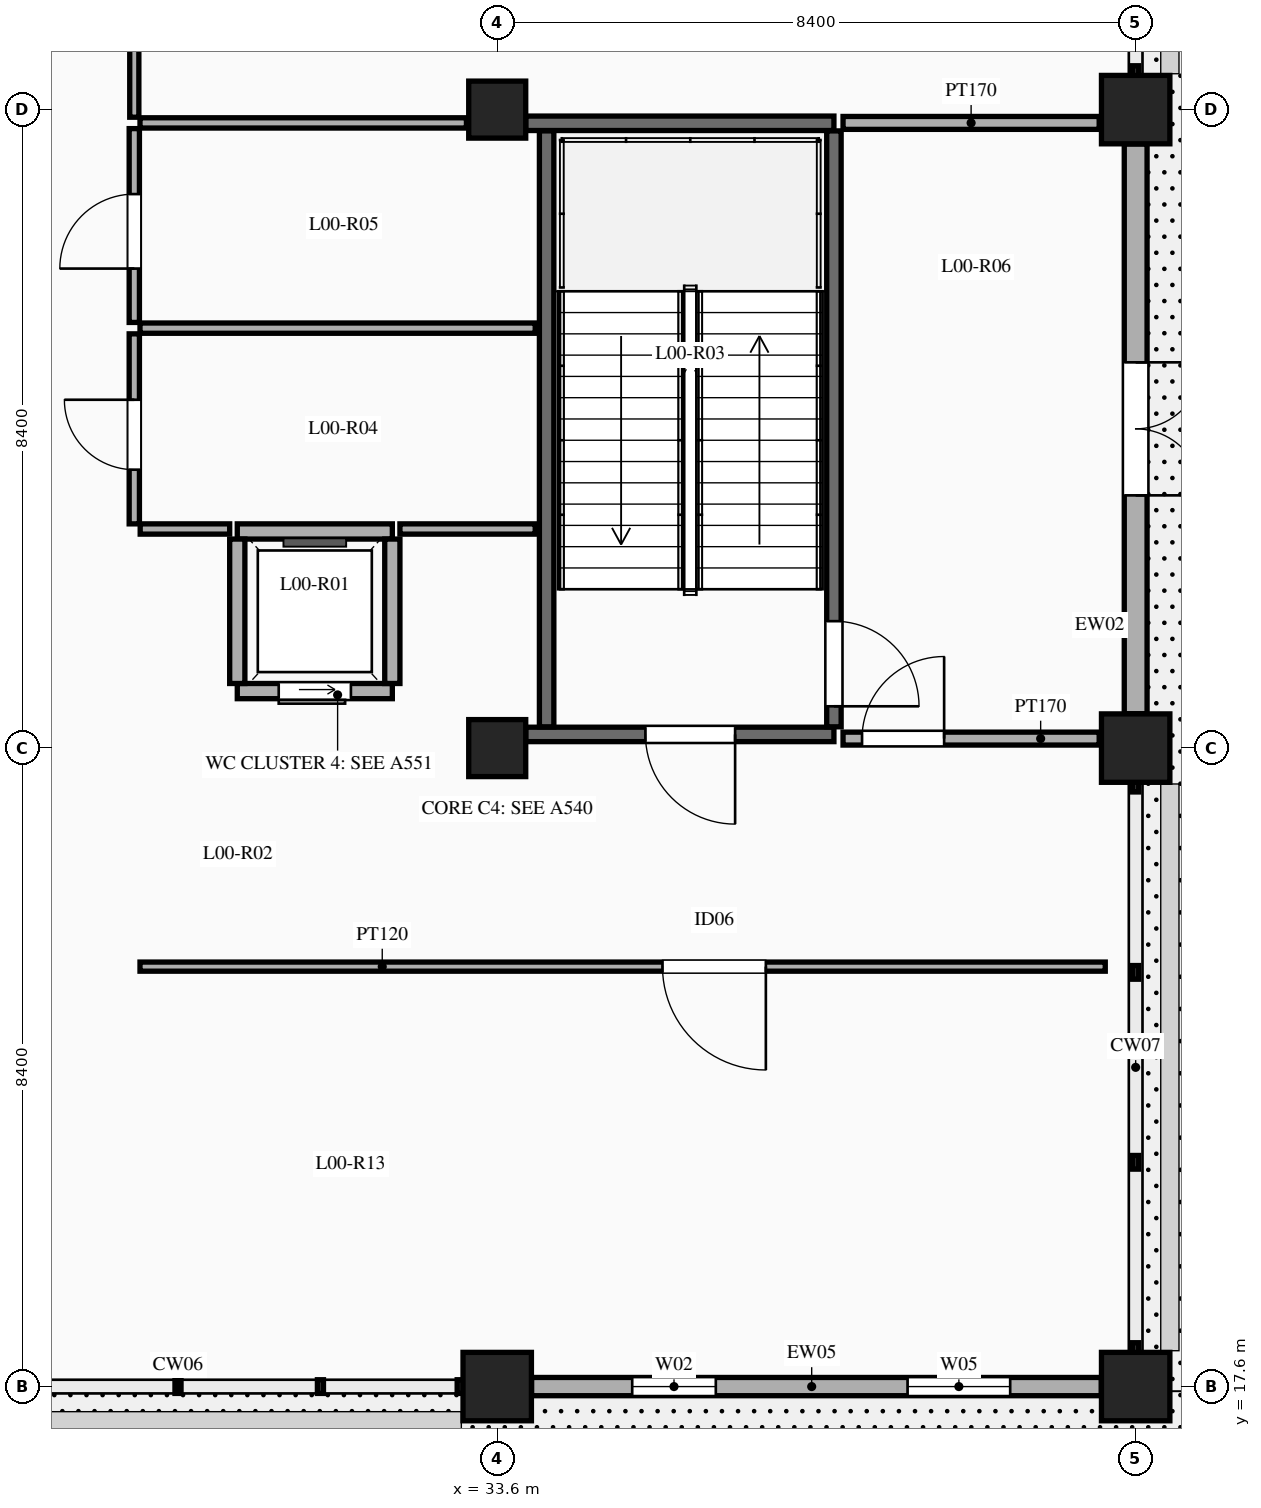
"""IFC4 building model, lengths in metres.
Left out: names, types, materials, properties, quantities, classifications, styles, units other than length and angle.
Written with IfcOpenShell. Run it as: python <this file> out.ifc"""

import sys

from ifc_helpers import new_model, si_unit, direction, frame, frame_2d, origin, origin_2d, place, context, subcontext, project, spatial, rectangle, circle, extrude, element, fill, save


model = new_model("IFC4")
c1 = context("Model", 3, precision=1e-05, world=origin(), true_north=direction((0.0, 1.0)))
c2 = subcontext(c1, "Body", "Model", "MODEL_VIEW")
j1 = project(units=[si_unit("LENGTHUNIT", "METRE"), si_unit("PLANEANGLEUNIT", "RADIAN")], contexts=[c1])
p1 = place(None, origin())
s1 = spatial("IfcSite", under=j1, at=p1, CompositionType="ELEMENT")
p2 = place(p1, origin())
s2 = spatial("IfcBuilding", under=s1, at=p2, CompositionType="ELEMENT")
p3 = place(p2, origin())
s3 = spatial("IfcBuildingStorey", under=s2, at=p3, CompositionType="ELEMENT", Elevation=0.0)
p4 = place(p3, frame((33.6, 17.6, 0.0), z_axis=(0.0, 0.0, 1.0), x_axis=(1.0, 0.0, 0.0)))
e1 = element("IfcColumn", 1, at=p4, inside=s3, PredefinedType="COLUMN", context=c2, shape_type="SweptSolid", body=[
    extrude(circle(Radius=0.45, at=origin_2d()), origin(), (0.0, 0.0, 1.0), 5.4),
])
for number, where, z_axis, x_axis in (
    (2, (33.6, 26.0, 0.0), (0.0, 0.0, 1.0), (1.0, 0.0, 0.0)),
    (3, (33.6, 34.4, 0.0), (0.0, 0.0, 1.0), (1.0, 0.0, 0.0)),
):
    element("IfcColumn", number, at=place(p3, frame(where, z_axis=z_axis, x_axis=x_axis)), inside=s3, PredefinedType="COLUMN", context=c2, shape_type="SweptSolid", body=[
        extrude(rectangle(XDim=0.75, YDim=0.75, at=origin_2d()), origin(), (0.0, 0.0, 1.0), 5.4),
    ])
for number, where, z_axis, x_axis in (
    (4, (42.0, 17.6, 0.0), (0.0, 0.0, 1.0), (1.0, 0.0, 0.0)),
    (5, (42.0, 26.0, 0.0), (0.0, 0.0, 1.0), (1.0, 0.0, 0.0)),
    (6, (42.0, 34.4, 0.0), (0.0, 0.0, 1.0), (1.0, 0.0, 0.0)),
):
    element("IfcColumn", number, at=place(p3, frame(where, z_axis=z_axis, x_axis=x_axis)), inside=s3, PredefinedType="COLUMN", context=c2, shape_type="SweptSolid", body=[
        extrude(circle(Radius=0.45, at=origin_2d()), origin(), (0.0, 0.0, 1.0), 5.4),
    ])
p5 = place(p3, frame((34.052, 17.6, 0.0), z_axis=(0.0, 0.0, 1.0), x_axis=(1.0, 0.0, 0.0)))
e7 = element("IfcWall", 7, at=p5, inside=s3, PredefinedType="SOLIDWALL", context=c2, shape_type="SweptSolid", body=[
    extrude(rectangle(XDim=7.496, YDim=0.24, at=frame_2d((3.748, 0.0))), origin(), (0.0, 0.0, 1.0), 4.45),
])
p6 = place(p5, frame((1.324, 0.0, 0.9)))
e8 = element("IfcOpeningElement", 8, at=p6, cuts=e7, PredefinedType="OPENING", context=c2, shape_type="SweptSolid", body=[
    extrude(rectangle(XDim=1.1, YDim=1.95, at=frame_2d((0.55, 0.975))), frame((0.0, 0.13, 0.0), z_axis=(0.0, -1.0, 0.0), x_axis=(1.0, 0.0, 0.0)), (0.0, 0.0, 1.0), 0.26),
])
p7 = place(p5, frame((4.947, 0.0, 0.9)))
e9 = element("IfcOpeningElement", 9, at=p7, cuts=e7, PredefinedType="OPENING", context=c2, shape_type="SweptSolid", body=[
    extrude(rectangle(XDim=1.35, YDim=1.85, at=frame_2d((0.675, 0.925))), frame((0.0, 0.13, 0.0), z_axis=(0.0, -1.0, 0.0), x_axis=(1.0, 0.0, 0.0)), (0.0, 0.0, 1.0), 0.26),
])
p8 = place(p3, frame((42.0, 26.452, 0.0), z_axis=(0.0, 0.0, 1.0), x_axis=(0.0, 1.0, 0.0)))
e10 = element("IfcWall", 10, at=p8, inside=s3, PredefinedType="SOLIDWALL", context=c2, shape_type="SweptSolid", body=[
    extrude(rectangle(XDim=7.496, YDim=0.3, at=frame_2d((3.748, 0.0))), origin(), (0.0, 0.0, 1.0), 4.45),
])
p9 = place(p8, frame((2.873, 0.0, 0.0)))
e11 = element("IfcOpeningElement", 11, at=p9, cuts=e10, PredefinedType="OPENING", context=c2, shape_type="SweptSolid", body=[
    extrude(rectangle(XDim=1.75, YDim=2.35, at=frame_2d((0.875, 1.175))), frame((0.0, 0.16, 0.0), z_axis=(0.0, -1.0, 0.0), x_axis=(1.0, 0.0, 0.0)), (0.0, 0.0, 1.0), 0.32),
])
p10 = place(p3, frame((30.18, 26.75, 0.0), z_axis=(0.0, 0.0, 1.0), x_axis=(1.0, 0.0, 0.0)))
e12 = element("IfcWall", 12, at=p10, inside=s3, PredefinedType="SOLIDWALL", context=c2, shape_type="SweptSolid", body=[
    extrude(rectangle(XDim=2.04, YDim=0.2, at=frame_2d((1.02, 0.0))), origin(), (0.0, 0.0, 1.0), 5.2),
])
p11 = place(p10, frame((0.545, 0.0, 0.0)))
e13 = element("IfcOpeningElement", 13, at=p11, cuts=e12, PredefinedType="OPENING", context=c2, shape_type="SweptSolid", body=[
    extrude(rectangle(XDim=0.95, YDim=2.15, at=frame_2d((0.475, 1.075))), frame((0.0, 0.11, 0.0), z_axis=(0.0, -1.0, 0.0), x_axis=(1.0, 0.0, 0.0)), (0.0, 0.0, 1.0), 0.22),
])
p12 = place(p3, frame((30.18, 28.85, 0.0), z_axis=(0.0, 0.0, 1.0), x_axis=(1.0, 0.0, 0.0)))
e14 = element("IfcWall", 14, at=p12, inside=s3, PredefinedType="SOLIDWALL", context=c2, shape_type="SweptSolid", body=[
    extrude(rectangle(XDim=2.04, YDim=0.2, at=frame_2d((1.02, 0.0))), origin(), (0.0, 0.0, 1.0), 5.2),
])
for number, where, z_axis, x_axis in (
    (15, (30.18, 26.85, 0.0), (0.0, 0.0, 1.0), (0.0, 1.0, 0.0)),
    (16, (32.22, 26.85, 0.0), (0.0, 0.0, 1.0), (0.0, 1.0, 0.0)),
):
    element("IfcWall", number, at=place(p3, frame(where, z_axis=z_axis, x_axis=x_axis)), inside=s3, PredefinedType="SOLIDWALL", context=c2, shape_type="SweptSolid", body=[
        extrude(rectangle(XDim=1.9, YDim=0.2, at=frame_2d((0.95, 0.0))), origin(), (0.0, 0.0, 1.0), 5.2),
    ])
p13 = place(p3, frame((33.975, 26.18, 0.0), z_axis=(0.0, 0.0, 1.0), x_axis=(1.0, 0.0, 0.0)))
e17 = element("IfcWall", 17, at=p13, inside=s3, PredefinedType="SOLIDWALL", context=c2, shape_type="SweptSolid", body=[
    extrude(rectangle(XDim=4.055, YDim=0.19, at=frame_2d((2.027, 0.0))), origin(), (0.0, 0.0, 1.0), 5.2),
])
p14 = place(p13, frame((1.575, 0.0, 0.0)))
e18 = element("IfcOpeningElement", 18, at=p14, cuts=e17, PredefinedType="OPENING", context=c2, shape_type="SweptSolid", body=[
    extrude(rectangle(XDim=1.18, YDim=2.15, at=frame_2d((0.59, 1.075))), frame((0.0, 0.105, 0.0), z_axis=(0.0, -1.0, 0.0), x_axis=(1.0, 0.0, 0.0)), (0.0, 0.0, 1.0), 0.21),
])
p15 = place(p3, frame((33.975, 34.22, 0.0), z_axis=(0.0, 0.0, 1.0), x_axis=(1.0, 0.0, 0.0)))
e19 = element("IfcWall", 19, at=p15, inside=s3, PredefinedType="SOLIDWALL", context=c2, shape_type="SweptSolid", body=[
    extrude(rectangle(XDim=4.055, YDim=0.19, at=frame_2d((2.027, 0.0))), origin(), (0.0, 0.0, 1.0), 5.2),
])
p16 = place(p3, frame((34.25, 26.28, 0.0), z_axis=(0.0, 0.0, 1.0), x_axis=(0.0, 1.0, 0.0)))
e20 = element("IfcWall", 20, at=p16, inside=s3, PredefinedType="SOLIDWALL", context=c2, shape_type="SweptSolid", body=[
    extrude(rectangle(XDim=7.84, YDim=0.19, at=frame_2d((3.92, 0.0))), origin(), (0.0, 0.0, 1.0), 5.2),
])
p17 = place(p3, frame((38.03, 26.28, 0.0), z_axis=(0.0, 0.0, 1.0), x_axis=(0.0, 1.0, 0.0)))
e21 = element("IfcWall", 21, at=p17, inside=s3, PredefinedType="SOLIDWALL", context=c2, shape_type="SweptSolid", body=[
    extrude(rectangle(XDim=7.84, YDim=0.19, at=frame_2d((3.92, 0.0))), origin(), (0.0, 0.0, 1.0), 5.2),
])
p18 = place(p17, frame((0.27, 0.0, 0.0)))
e22 = element("IfcOpeningElement", 22, at=p18, cuts=e21, PredefinedType="OPENING", context=c2, shape_type="SweptSolid", body=[
    extrude(rectangle(XDim=1.12, YDim=2.15, at=frame_2d((0.56, 1.075))), frame((0.0, 0.105, 0.0), z_axis=(0.0, -1.0, 0.0), x_axis=(1.0, 0.0, 0.0)), (0.0, 0.0, 1.0), 0.21),
])
p19 = place(p3, frame((38.15, 26.125, 0.0), z_axis=(0.0, 0.0, 1.0), x_axis=(1.0, 0.0, 0.0)))
e23 = element("IfcWall", 23, at=p19, inside=s3, PredefinedType="PARTITIONING", context=c2, shape_type="SweptSolid", body=[
    extrude(rectangle(XDim=3.37, YDim=0.17, at=frame_2d((1.685, 0.0))), origin(), (0.0, 0.0, 1.0), 4.35),
])
p20 = place(p19, frame((0.25, 0.0, 0.0)))
e24 = element("IfcOpeningElement", 24, at=p20, cuts=e23, PredefinedType="OPENING", context=c2, shape_type="SweptSolid", body=[
    extrude(rectangle(XDim=1.08, YDim=2.15, at=frame_2d((0.54, 1.075))), frame((0.0, 0.095, 0.0), z_axis=(0.0, -1.0, 0.0), x_axis=(1.0, 0.0, 0.0)), (0.0, 0.0, 1.0), 0.19),
])
p21 = place(p3, frame((28.9, 23.125, 0.0), z_axis=(0.0, 0.0, 1.0), x_axis=(1.0, 0.0, 0.0)))
e25 = element("IfcWall", 25, at=p21, inside=s3, PredefinedType="PARTITIONING", context=c2, shape_type="SweptSolid", body=[
    extrude(rectangle(XDim=12.7, YDim=0.12, at=frame_2d((6.35, 0.0))), origin(), (0.0, 0.0, 1.0), 4.35),
])
p22 = place(p21, frame((6.875, 0.0, 0.0)))
e26 = element("IfcOpeningElement", 26, at=p22, cuts=e25, PredefinedType="OPENING", context=c2, shape_type="SweptSolid", body=[
    extrude(rectangle(XDim=1.36, YDim=2.3, at=frame_2d((0.68, 1.15))), frame((0.0, 0.07, 0.0), z_axis=(0.0, -1.0, 0.0), x_axis=(1.0, 0.0, 0.0)), (0.0, 0.0, 1.0), 0.14),
])
p23 = place(p3, frame((28.9, 31.525, 0.0), z_axis=(0.0, 0.0, 1.0), x_axis=(1.0, 0.0, 0.0)))
e27 = element("IfcWall", 27, at=p23, inside=s3, PredefinedType="PARTITIONING", context=c2, shape_type="SweptSolid", body=[
    extrude(rectangle(XDim=5.2, YDim=0.135, at=frame_2d((2.6, 0.0))), origin(), (0.0, 0.0, 1.0), 4.35),
])
p24 = place(p3, frame((28.825, 28.95, 0.0), z_axis=(0.0, 0.0, 1.0), x_axis=(0.0, 1.0, 0.0)))
e28 = element("IfcWall", 28, at=p24, inside=s3, PredefinedType="PARTITIONING", context=c2, shape_type="SweptSolid", body=[
    extrude(rectangle(XDim=2.5, YDim=0.135, at=frame_2d((1.25, 0.0))), origin(), (0.0, 0.0, 1.0), 4.35),
])
p25 = place(p24, frame((0.713, 0.0, 0.0)))
e29 = element("IfcOpeningElement", 29, at=p25, cuts=e28, PredefinedType="OPENING", context=c2, shape_type="SweptSolid", body=[
    extrude(rectangle(XDim=0.92, YDim=2.12, at=frame_2d((0.46, 1.06))), frame((0.0, 0.077, 0.0), z_axis=(0.0, -1.0, 0.0), x_axis=(1.0, 0.0, 0.0)), (0.0, 0.0, 1.0), 0.155),
])
p26 = place(p3, frame((28.825, 31.6, 0.0), z_axis=(0.0, 0.0, 1.0), x_axis=(0.0, 1.0, 0.0)))
e30 = element("IfcWall", 30, at=p26, inside=s3, PredefinedType="PARTITIONING", context=c2, shape_type="SweptSolid", body=[
    extrude(rectangle(XDim=2.55, YDim=0.135, at=frame_2d((1.275, 0.0))), origin(), (0.0, 0.0, 1.0), 4.35),
])
p27 = place(p26, frame((0.708, 0.0, 0.0)))
e31 = element("IfcOpeningElement", 31, at=p27, cuts=e30, PredefinedType="OPENING", context=c2, shape_type="SweptSolid", body=[
    extrude(rectangle(XDim=0.98, YDim=2.15, at=frame_2d((0.49, 1.075))), frame((0.0, 0.077, 0.0), z_axis=(0.0, -1.0, 0.0), x_axis=(1.0, 0.0, 0.0)), (0.0, 0.0, 1.0), 0.155),
])
p28 = place(p3, frame((28.9, 34.225, 0.0), z_axis=(0.0, 0.0, 1.0), x_axis=(1.0, 0.0, 0.0)))
e32 = element("IfcWall", 32, at=p28, inside=s3, PredefinedType="PARTITIONING", context=c2, shape_type="SweptSolid", body=[
    extrude(rectangle(XDim=4.295, YDim=0.135, at=frame_2d((2.147, 0.0))), origin(), (0.0, 0.0, 1.0), 4.35),
])
p29 = place(p3, frame((38.15, 34.225, 0.0), z_axis=(0.0, 0.0, 1.0), x_axis=(1.0, 0.0, 0.0)))
e33 = element("IfcWall", 33, at=p29, inside=s3, PredefinedType="PARTITIONING", context=c2, shape_type="SweptSolid", body=[
    extrude(rectangle(XDim=3.37, YDim=0.17, at=frame_2d((1.685, 0.0))), origin(), (0.0, 0.0, 1.0), 4.35),
])
p30 = place(p3, frame((28.825, 34.3, 0.0), z_axis=(0.0, 0.0, 1.0), x_axis=(0.0, 1.0, 0.0)))
e34 = element("IfcWall", 34, at=p30, inside=s3, PredefinedType="PARTITIONING", context=c2, shape_type="SweptSolid", body=[
    extrude(rectangle(XDim=21.9, YDim=0.12, at=frame_2d((10.95, 0.0))), origin(), (0.0, 0.0, 1.0), 4.35),
])
p31 = place(p30, frame((10.27, 0.0, 0.0)))
e35 = element("IfcOpeningElement", 35, at=p31, cuts=e34, PredefinedType="OPENING", context=c2, shape_type="SweptSolid", body=[
    extrude(rectangle(XDim=1.36, YDim=2.3, at=frame_2d((0.68, 1.15))), frame((0.0, 0.07, 0.0), z_axis=(0.0, -1.0, 0.0), x_axis=(1.0, 0.0, 0.0)), (0.0, 0.0, 1.0), 0.14),
])
p32 = place(p3, frame((28.903, 28.883, 0.0), z_axis=(0.0, 0.0, 1.0), x_axis=(1.0, 0.0, 0.0)))
e36 = element("IfcWall", 36, at=p32, inside=s3, PredefinedType="PARTITIONING", context=c2, shape_type="SweptSolid", body=[
    extrude(rectangle(XDim=1.177, YDim=0.135, at=frame_2d((0.589, 0.0))), origin(), (0.0, 0.0, 1.0), 4.35),
])
p33 = place(p3, frame((32.32, 28.883, 0.0), z_axis=(0.0, 0.0, 1.0), x_axis=(1.0, 0.0, 0.0)))
e37 = element("IfcWall", 37, at=p33, inside=s3, PredefinedType="PARTITIONING", context=c2, shape_type="SweptSolid", body=[
    extrude(rectangle(XDim=1.78, YDim=0.135, at=frame_2d((0.89, 0.0))), origin(), (0.0, 0.0, 1.0), 4.35),
])
p34 = place(p6, origin())
e38 = element("IfcWindow", 38, at=p34, inside=s3, PartitioningType="SINGLE_PANEL", PredefinedType="WINDOW", context=c2, shape_type="SweptSolid", body=[
    extrude(rectangle(XDim=1.1, YDim=1.95, at=frame_2d((0.55, 0.975))), frame((0.0, 0.03, 0.0), z_axis=(0.0, -1.0, 0.0), x_axis=(1.0, 0.0, 0.0)), (0.0, 0.0, 1.0), 0.06),
])
fill(e8, e38)
p35 = place(p7, origin())
e39 = element("IfcWindow", 39, at=p35, inside=s3, PartitioningType="DOUBLE_PANEL_VERTICAL", PredefinedType="WINDOW", context=c2, shape_type="SweptSolid", body=[
    extrude(rectangle(XDim=1.35, YDim=1.85, at=frame_2d((0.675, 0.925))), frame((0.0, 0.03, 0.0), z_axis=(0.0, -1.0, 0.0), x_axis=(1.0, 0.0, 0.0)), (0.0, 0.0, 1.0), 0.06),
])
fill(e9, e39)
p36 = place(p9, frame((1.75, 0.0, 0.0), z_axis=(0.0, 0.0, 1.0), x_axis=(-1.0, 0.0, 0.0)))
e40 = element("IfcDoor", 40, at=p36, inside=s3, OperationType="DOUBLE_DOOR_SINGLE_SWING", PredefinedType="DOOR", context=c2, shape_type="SweptSolid", body=[
    extrude(rectangle(XDim=1.75, YDim=2.35, at=frame_2d((0.875, 1.175))), frame((0.0, 0.025, 0.0), z_axis=(0.0, -1.0, 0.0), x_axis=(1.0, 0.0, 0.0)), (0.0, 0.0, 1.0), 0.05),
])
fill(e11, e40)
p37 = place(p11, frame((0.95, 0.0, 0.0), z_axis=(0.0, 0.0, 1.0), x_axis=(-1.0, 0.0, 0.0)))
e41 = element("IfcDoor", 41, at=p37, inside=s3, OperationType="SLIDING_TO_LEFT", PredefinedType="DOOR", context=c2, shape_type="SweptSolid", body=[
    extrude(rectangle(XDim=0.95, YDim=2.15, at=frame_2d((0.475, 1.075))), frame((0.0, 0.025, 0.0), z_axis=(0.0, -1.0, 0.0), x_axis=(1.0, 0.0, 0.0)), (0.0, 0.0, 1.0), 0.05),
])
fill(e13, e41)
p38 = place(p18, frame((1.12, 0.0, 0.0), z_axis=(0.0, 0.0, 1.0), x_axis=(-1.0, 0.0, 0.0)))
e42 = element("IfcDoor", 42, at=p38, inside=s3, OperationType="SINGLE_SWING_RIGHT", PredefinedType="DOOR", context=c2, shape_type="SweptSolid", body=[
    extrude(rectangle(XDim=1.12, YDim=2.15, at=frame_2d((0.56, 1.075))), frame((0.0, 0.025, 0.0), z_axis=(0.0, -1.0, 0.0), x_axis=(1.0, 0.0, 0.0)), (0.0, 0.0, 1.0), 0.05),
])
fill(e22, e42)
p39 = place(p14, frame((1.18, 0.0, 0.0), z_axis=(0.0, 0.0, 1.0), x_axis=(-1.0, 0.0, 0.0)))
e43 = element("IfcDoor", 43, at=p39, inside=s3, OperationType="SINGLE_SWING_LEFT", PredefinedType="DOOR", context=c2, shape_type="SweptSolid", body=[
    extrude(rectangle(XDim=1.18, YDim=2.15, at=frame_2d((0.59, 1.075))), frame((0.0, 0.025, 0.0), z_axis=(0.0, -1.0, 0.0), x_axis=(1.0, 0.0, 0.0)), (0.0, 0.0, 1.0), 0.05),
])
fill(e18, e43)
p40 = place(p25, origin())
e44 = element("IfcDoor", 44, at=p40, inside=s3, OperationType="SINGLE_SWING_RIGHT", PredefinedType="DOOR", context=c2, shape_type="SweptSolid", body=[
    extrude(rectangle(XDim=0.92, YDim=2.12, at=frame_2d((0.46, 1.06))), frame((0.0, 0.025, 0.0), z_axis=(0.0, -1.0, 0.0), x_axis=(1.0, 0.0, 0.0)), (0.0, 0.0, 1.0), 0.05),
])
fill(e29, e44)
p41 = place(p27, origin())
e45 = element("IfcDoor", 45, at=p41, inside=s3, OperationType="SINGLE_SWING_LEFT", PredefinedType="DOOR", context=c2, shape_type="SweptSolid", body=[
    extrude(rectangle(XDim=0.98, YDim=2.15, at=frame_2d((0.49, 1.075))), frame((0.0, 0.025, 0.0), z_axis=(0.0, -1.0, 0.0), x_axis=(1.0, 0.0, 0.0)), (0.0, 0.0, 1.0), 0.05),
])
fill(e31, e45)
p42 = place(p22, frame((1.36, 0.0, 0.0), z_axis=(0.0, 0.0, 1.0), x_axis=(-1.0, 0.0, 0.0)))
e46 = element("IfcDoor", 46, at=p42, inside=s3, OperationType="SINGLE_SWING_LEFT", PredefinedType="DOOR", context=c2, shape_type="SweptSolid", body=[
    extrude(rectangle(XDim=1.36, YDim=2.3, at=frame_2d((0.68, 1.15))), frame((0.0, 0.025, 0.0), z_axis=(0.0, -1.0, 0.0), x_axis=(1.0, 0.0, 0.0)), (0.0, 0.0, 1.0), 0.05),
])
fill(e26, e46)
p43 = place(p20, origin())
e47 = element("IfcDoor", 47, at=p43, inside=s3, OperationType="SINGLE_SWING_RIGHT", PredefinedType="DOOR", context=c2, shape_type="SweptSolid", body=[
    extrude(rectangle(XDim=1.08, YDim=2.15, at=frame_2d((0.54, 1.075))), frame((0.0, 0.025, 0.0), z_axis=(0.0, -1.0, 0.0), x_axis=(1.0, 0.0, 0.0)), (0.0, 0.0, 1.0), 0.05),
])
fill(e24, e47)
save(model, sys.argv[1])
